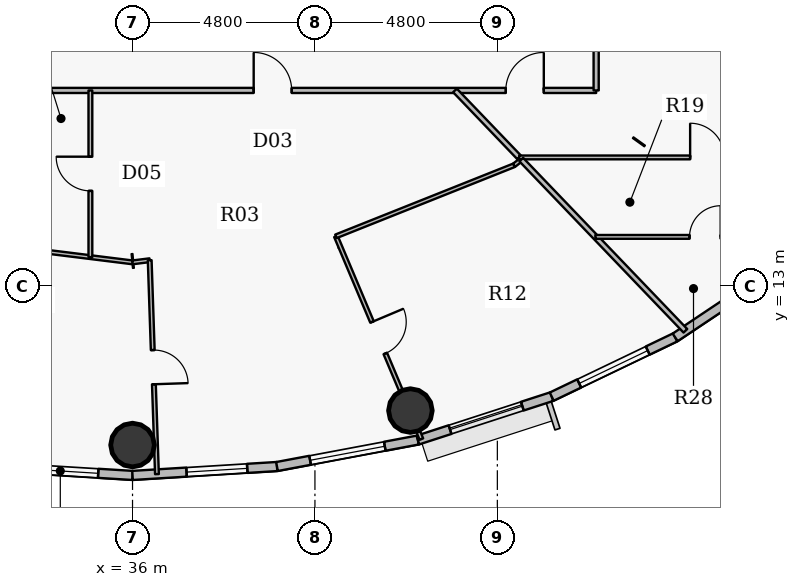
"""IFC4 building model, lengths in metres.
Left out: names, types, materials, properties, quantities, classifications, styles, units other than length and angle.
Written with IfcOpenShell. Run it as: python <this file> out.ifc"""

import sys

from ifc_helpers import new_model, si_unit, direction, frame, frame_2d, origin, origin_2d, place, context, subcontext, project, spatial, rectangle, hollow_circle, extrude, source, transform, mapped, element, fill, save


model = new_model("IFC4")
c1 = context("Model", 3, precision=1e-05, world=origin(), true_north=direction((0.0, 1.0)))
c2 = subcontext(c1, "Body", "Model", "MODEL_VIEW")
j1 = project(units=[si_unit("LENGTHUNIT", "METRE"), si_unit("PLANEANGLEUNIT", "RADIAN")], contexts=[c1])
p1 = place(None, origin())
s1 = spatial("IfcSite", under=j1, at=p1, CompositionType="ELEMENT")
p2 = place(p1, origin())
s2 = spatial("IfcBuilding", under=s1, at=p2, CompositionType="ELEMENT")
p3 = place(p2, frame((0.0, 0.0, 232.8)))
s3 = spatial("IfcBuildingStorey", under=s2, at=p3, CompositionType="ELEMENT", Elevation=232.8)
for number, where, z_axis, x_axis in (
    (1, (36.0, 8.82, 0.0), (0.0, 0.0, 1.0), (1.0, 0.0, 0.0)),
    (2, (43.312, 9.727, 0.0), (0.0, 0.0, 1.0), (1.0, 0.0, 0.0)),
):
    element("IfcColumn", number, at=place(p3, frame(where, z_axis=z_axis, x_axis=x_axis)), inside=s3, PredefinedType="COLUMN", context=c2, shape_type="SweptSolid", body=[
        extrude(hollow_circle(Radius=0.575, WallThickness=0.036, at=origin_2d()), origin(), (0.0, 0.0, 1.0), 3.75),
    ])
p4 = place(p3, frame((36.0, 8.02, 0.0), z_axis=(0.0, 0.0, 1.0), x_axis=(-0.998108785312, 0.06147237333, 0.0)))
e3 = element("IfcWall", 3, at=p4, inside=s3, PredefinedType="SOLIDWALL", context=c2, shape_type="SweptSolid", body=[
    extrude(rectangle(XDim=3.809, YDim=0.24, at=frame_2d((1.904, 0.0))), origin(), (0.0, 0.0, 1.0), 3.5),
])
p5 = place(p4, frame((0.904, 0.0, 0.9)))
e4 = element("IfcOpeningElement", 4, at=p5, cuts=e3, PredefinedType="OPENING", context=c2, shape_type="SweptSolid", body=[
    extrude(rectangle(XDim=2.0, YDim=1.75, at=origin_2d()), frame((1.0, 0.13, 0.875), z_axis=(0.0, -1.0, 0.0), x_axis=(1.0, 0.0, 0.0)), (0.0, 0.0, 1.0), 0.26),
])
p6 = place(p3, frame((39.802, 8.254, 0.0), z_axis=(0.0, 0.0, 1.0), x_axis=(-0.998108785312, -0.06147237333, 0.0)))
e5 = element("IfcWall", 5, at=p6, inside=s3, PredefinedType="SOLIDWALL", context=c2, shape_type="SweptSolid", body=[
    extrude(rectangle(XDim=3.809, YDim=0.24, at=frame_2d((1.904, 0.0))), origin(), (0.0, 0.0, 1.0), 3.5),
])
p7 = place(p6, frame((0.785, 0.0, 0.9)))
e6 = element("IfcOpeningElement", 6, at=p7, cuts=e5, PredefinedType="OPENING", context=c2, shape_type="SweptSolid", body=[
    extrude(rectangle(XDim=1.6, YDim=1.75, at=origin_2d()), frame((0.8, 0.13, 0.875), z_axis=(0.0, -1.0, 0.0), x_axis=(1.0, 0.0, 0.0)), (0.0, 0.0, 1.0), 0.26),
])
p8 = place(p3, frame((43.509, 8.951, 0.0), z_axis=(0.0, 0.0, 1.0), x_axis=(-0.982784898575, -0.184753465822, 0.0)))
e7 = element("IfcWall", 7, at=p8, inside=s3, PredefinedType="SOLIDWALL", context=c2, shape_type="SweptSolid", body=[
    extrude(rectangle(XDim=3.773, YDim=0.24, at=frame_2d((1.886, 0.0))), origin(), (0.0, 0.0, 1.0), 3.5),
])
p9 = place(p8, frame((0.886, 0.0, 0.9)))
e8 = element("IfcOpeningElement", 8, at=p9, cuts=e7, PredefinedType="OPENING", context=c2, shape_type="SweptSolid", body=[
    extrude(rectangle(XDim=2.0, YDim=1.75, at=origin_2d()), frame((1.0, 0.13, 0.875), z_axis=(0.0, -1.0, 0.0), x_axis=(1.0, 0.0, 0.0)), (0.0, 0.0, 1.0), 0.26),
])
p10 = place(p3, frame((47.031, 10.094, 0.0), z_axis=(0.0, 0.0, 1.0), x_axis=(-0.951210789182, -0.308541787354, 0.0)))
e9 = element("IfcWall", 9, at=p10, inside=s3, PredefinedType="SOLIDWALL", context=c2, shape_type="SweptSolid", body=[
    extrude(rectangle(XDim=3.702, YDim=0.24, at=frame_2d((1.851, 0.0))), origin(), (0.0, 0.0, 1.0), 3.5),
])
p11 = place(p10, frame((0.813, 0.0, 0.9)))
e10 = element("IfcOpeningElement", 10, at=p11, cuts=e9, PredefinedType="OPENING", context=c2, shape_type="SweptSolid", body=[
    extrude(rectangle(XDim=2.0, YDim=1.75, at=origin_2d()), frame((1.0, 0.13, 0.875), z_axis=(0.0, -1.0, 0.0), x_axis=(1.0, 0.0, 0.0)), (0.0, 0.0, 1.0), 0.26),
])
p12 = place(p3, frame((50.28, 11.652, 0.0), z_axis=(0.0, 0.0, 1.0), x_axis=(-0.901598104751, -0.432574684313, 0.0)))
e11 = element("IfcWall", 11, at=p12, inside=s3, PredefinedType="SOLIDWALL", context=c2, shape_type="SweptSolid", body=[
    extrude(rectangle(XDim=3.604, YDim=0.24, at=frame_2d((1.802, 0.0))), origin(), (0.0, 0.0, 1.0), 3.5),
])
p13 = place(p12, frame((0.802, 0.0, 0.9)))
e12 = element("IfcOpeningElement", 12, at=p13, cuts=e11, PredefinedType="OPENING", context=c2, shape_type="SweptSolid", body=[
    extrude(rectangle(XDim=2.0, YDim=1.75, at=origin_2d()), frame((1.0, 0.13, 0.875), z_axis=(0.0, -1.0, 0.0), x_axis=(1.0, 0.0, 0.0)), (0.0, 0.0, 1.0), 0.26),
])
p14 = place(p3, frame((53.176, 13.589, 0.0), z_axis=(0.0, 0.0, 1.0), x_axis=(-0.831262496074, -0.555880079352, 0.0)))
e13 = element("IfcWall", 13, at=p14, inside=s3, PredefinedType="SOLIDWALL", context=c2, shape_type="SweptSolid", body=[
    extrude(rectangle(XDim=3.484, YDim=0.24, at=frame_2d((1.742, 0.0))), origin(), (0.0, 0.0, 1.0), 3.5),
])
p15 = place(p3, frame((24.35, 18.15, 0.0), z_axis=(0.0, 0.0, 1.0), x_axis=(1.0, 0.0, 0.0)))
e14 = element("IfcWall", 14, at=p15, inside=s3, PredefinedType="PARTITIONING", context=c2, shape_type="SweptSolid", body=[
    extrude(rectangle(XDim=23.85, YDim=0.135, at=frame_2d((11.925, 0.0))), origin(), (0.0, 0.0, 1.0), 2.935),
])
p16 = place(p15, frame((14.838, 0.0, 0.0)))
e15 = element("IfcOpeningElement", 15, at=p16, cuts=e14, PredefinedType="OPENING", context=c2, shape_type="SweptSolid", body=[
    extrude(rectangle(XDim=1.0, YDim=2.15, at=origin_2d()), frame((0.5, 0.078, 1.075), z_axis=(0.0, -1.0, 0.0), x_axis=(1.0, 0.0, 0.0)), (0.0, 0.0, 1.0), 0.155),
])
p17 = place(p15, frame((21.472, 0.0, 0.0)))
e16 = element("IfcOpeningElement", 16, at=p17, cuts=e14, PredefinedType="OPENING", context=c2, shape_type="SweptSolid", body=[
    extrude(rectangle(XDim=1.0, YDim=2.15, at=origin_2d()), frame((0.5, 0.078, 1.075), z_axis=(0.0, -1.0, 0.0), x_axis=(1.0, 0.0, 0.0)), (0.0, 0.0, 1.0), 0.155),
])
p18 = place(p3, frame((30.722, 14.281, 0.0), z_axis=(0.0, 0.0, 1.0), x_axis=(0.992398864395, -0.123062967412, 0.0)))
e17 = element("IfcWall", 17, at=p18, inside=s3, PredefinedType="PARTITIONING", context=c2, shape_type="SweptSolid", body=[
    extrude(rectangle(XDim=5.319, YDim=0.1, at=frame_2d((2.659, 0.0))), origin(), (0.0, 0.0, 1.0), 2.935),
])
p19 = place(p3, frame((34.891, 13.764, 0.0), z_axis=(0.0, 0.0, 1.0), x_axis=(0.0, 1.0, 0.0)))
e18 = element("IfcWall", 18, at=p19, inside=s3, PredefinedType="PARTITIONING", context=c2, shape_type="SweptSolid", body=[
    extrude(rectangle(XDim=4.386, YDim=0.1, at=frame_2d((2.193, 0.0))), origin(), (0.0, 0.0, 1.0), 3.5),
])
p20 = place(p19, frame((1.743, 0.0, 0.0)))
e19 = element("IfcOpeningElement", 19, at=p20, cuts=e18, PredefinedType="OPENING", context=c2, shape_type="SweptSolid", body=[
    extrude(rectangle(XDim=0.9, YDim=2.1, at=origin_2d()), frame((0.45, 0.06, 1.05), z_axis=(0.0, -1.0, 0.0), x_axis=(1.0, 0.0, 0.0)), (0.0, 0.0, 1.0), 0.12),
])
p21 = place(p3, frame((36.0, 13.626, 0.0), z_axis=(0.0, 0.0, 1.0), x_axis=(0.992368340182, 0.123308869931, 0.0)))
e20 = element("IfcWall", 20, at=p21, inside=s3, PredefinedType="PARTITIONING", context=c2, shape_type="SweptSolid", body=[
    extrude(rectangle(XDim=0.455, YDim=0.1, at=frame_2d((0.228, 0.0))), origin(), (0.0, 0.0, 1.0), 2.935),
])
p22 = place(p3, frame((36.452, 13.683, 0.0), z_axis=(0.0, 0.0, 1.0), x_axis=(0.033903801357, -0.999425100872, 0.0)))
e21 = element("IfcWall", 21, at=p22, inside=s3, PredefinedType="PARTITIONING", context=c2, shape_type="SweptSolid", body=[
    extrude(rectangle(XDim=5.631, YDim=0.1, at=frame_2d((2.815, 0.0))), origin(), (0.0, 0.0, 1.0), 2.985),
])
p23 = place(p22, frame((2.365, 0.0, 0.0)))
e22 = element("IfcOpeningElement", 22, at=p23, cuts=e21, PredefinedType="OPENING", context=c2, shape_type="SweptSolid", body=[
    extrude(rectangle(XDim=0.9, YDim=2.1, at=origin_2d()), frame((0.45, 0.06, 1.05), z_axis=(0.0, -1.0, 0.0), x_axis=(1.0, 0.0, 0.0)), (0.0, 0.0, 1.0), 0.12),
])
p24 = place(p3, frame((41.352, 14.311, 0.0), z_axis=(0.0, 0.0, 1.0), x_axis=(0.388594226314, -0.921408990229, 0.0)))
e23 = element("IfcWall", 23, at=p24, inside=s3, PredefinedType="PARTITIONING", context=c2, shape_type="SweptSolid", body=[
    extrude(rectangle(XDim=5.79, YDim=0.1, at=frame_2d((2.895, 0.0))), origin(), (0.0, 0.0, 1.0), 2.935),
])
p25 = place(p24, frame((2.445, 0.0, 0.0)))
e24 = element("IfcOpeningElement", 24, at=p25, cuts=e23, PredefinedType="OPENING", context=c2, shape_type="SweptSolid", body=[
    extrude(rectangle(XDim=0.9, YDim=2.1, at=origin_2d()), frame((0.45, 0.06, 1.05), z_axis=(0.0, -1.0, 0.0), x_axis=(1.0, 0.0, 0.0)), (0.0, 0.0, 1.0), 0.12),
])
p26 = place(p3, frame((41.352, 14.311, 0.0), z_axis=(0.0, 0.0, 1.0), x_axis=(0.928803297531, 0.370573116261, 0.0)))
e25 = element("IfcWall", 25, at=p26, inside=s3, PredefinedType="PARTITIONING", context=c2, shape_type="SweptSolid", body=[
    extrude(rectangle(XDim=5.047, YDim=0.1, at=frame_2d((2.523, 0.0))), origin(), (0.0, 0.0, 1.0), 2.935),
])
p27 = place(p3, frame((44.485, 18.15, 0.0), z_axis=(0.0, 0.0, 1.0), x_axis=(0.692102956666, -0.72179879286, 0.0)))
e26 = element("IfcWall", 26, at=p27, inside=s3, PredefinedType="PARTITIONING", context=c2, shape_type="SweptSolid", body=[
    extrude(rectangle(XDim=2.442, YDim=0.135, at=frame_2d((1.221, 0.0))), origin(), (0.0, 0.0, 1.0), 3.5),
])
p28 = place(p3, frame((46.039, 16.181, 0.0), z_axis=(0.0, 0.0, 1.0), x_axis=(0.787611392409, 0.616172292909, 0.0)))
e27 = element("IfcWall", 27, at=p28, inside=s3, PredefinedType="PARTITIONING", context=c2, shape_type="SweptSolid", body=[
    extrude(rectangle(XDim=0.242, YDim=0.1, at=frame_2d((0.121, 0.0))), origin(), (0.0, 0.0, 1.0), 3.5),
])
p29 = place(p3, frame((46.175, 16.387, 0.0), z_axis=(0.0, 0.0, 1.0), x_axis=(1.0, 0.0, 0.0)))
e28 = element("IfcWall", 28, at=p29, inside=s3, PredefinedType="PARTITIONING", context=c2, shape_type="SweptSolid", body=[
    extrude(rectangle(XDim=9.896, YDim=0.1, at=frame_2d((4.948, 0.0))), origin(), (0.0, 0.0, 1.0), 2.935),
])
p30 = place(p29, frame((4.498, 0.0, 0.0)))
e29 = element("IfcOpeningElement", 29, at=p30, cuts=e28, PredefinedType="OPENING", context=c2, shape_type="SweptSolid", body=[
    extrude(rectangle(XDim=0.9, YDim=2.1, at=origin_2d()), frame((0.45, 0.06, 1.05), z_axis=(0.0, -1.0, 0.0), x_axis=(1.0, 0.0, 0.0)), (0.0, 0.0, 1.0), 0.12),
])
p31 = place(p3, frame((46.23, 16.33, 0.0), z_axis=(0.0, 0.0, 1.0), x_axis=(0.69206255942, -0.721837525935, 0.0)))
e30 = element("IfcWall", 30, at=p31, inside=s3, PredefinedType="PARTITIONING", context=c2, shape_type="SweptSolid", body=[
    extrude(rectangle(XDim=6.24, YDim=0.135, at=frame_2d((3.12, 0.0))), origin(), (0.0, 0.0, 1.0), 2.985),
])
p32 = place(p3, frame((48.179, 14.297, 0.0), z_axis=(0.0, 0.0, 1.0), x_axis=(1.0, 0.0, 0.0)))
e31 = element("IfcWall", 31, at=p32, inside=s3, PredefinedType="PARTITIONING", context=c2, shape_type="SweptSolid", body=[
    extrude(rectangle(XDim=5.776, YDim=0.1, at=frame_2d((2.888, 0.0))), origin(), (0.0, 0.0, 1.0), 2.935),
])
p33 = place(p32, frame((2.478, 0.0, 0.0)))
e32 = element("IfcOpeningElement", 32, at=p33, cuts=e31, PredefinedType="OPENING", context=c2, shape_type="SweptSolid", body=[
    extrude(rectangle(XDim=0.82, YDim=2.1, at=origin_2d()), frame((0.41, 0.06, 1.05), z_axis=(0.0, -1.0, 0.0), x_axis=(1.0, 0.0, 0.0)), (0.0, 0.0, 1.0), 0.12),
])
p34 = place(p3, frame((48.2, 18.15, 0.0), z_axis=(0.0, 0.0, 1.0), x_axis=(0.0, 1.0, 0.0)))
e33 = element("IfcWall", 33, at=p34, inside=s3, PredefinedType="PARTITIONING", context=c2, shape_type="SweptSolid", body=[
    extrude(rectangle(XDim=1.9, YDim=0.135, at=frame_2d((0.95, 0.0))), origin(), (0.0, 0.0, 1.0), 3.5),
])
p35 = place(p3, frame((50.482, 20.16, 0.0), z_axis=(0.0, 0.0, 1.0), x_axis=(0.904207257568, -0.42709394208, 0.0)))
e34 = element("IfcWall", 34, at=p35, inside=s3, PredefinedType="PARTITIONING", context=c2, shape_type="SweptSolid", body=[
    extrude(rectangle(XDim=6.897, YDim=0.1, at=frame_2d((3.448, 0.0))), origin(), (0.0, 0.0, 1.0), 2.985),
])
p36 = place(p35, frame((2.998, 0.0, 0.0)))
e35 = element("IfcOpeningElement", 35, at=p36, cuts=e34, PredefinedType="OPENING", context=c2, shape_type="SweptSolid", body=[
    extrude(rectangle(XDim=0.9, YDim=2.1, at=origin_2d()), frame((0.45, 0.06, 1.05), z_axis=(0.0, -1.0, 0.0), x_axis=(1.0, 0.0, 0.0)), (0.0, 0.0, 1.0), 0.12),
])
m1 = source(origin(), c2, "Body", "SweptSolid", [
    extrude(rectangle(XDim=2.0, YDim=1.75, at=origin_2d()), frame((1.0, 0.03, 0.875), z_axis=(0.0, -1.0, 0.0), x_axis=(1.0, 0.0, 0.0)), (0.0, 0.0, 1.0), 0.06),
])
p37 = place(p5, origin())
e36 = element("IfcWindow", 36, at=p37, inside=s3, PartitioningType="DOUBLE_PANEL_VERTICAL", PredefinedType="WINDOW", context=c2, shape_type="MappedRepresentation", body=[
    mapped(m1, transform((0.0, 0.0, 0.0), x_axis=(1.0, 0.0, 0.0), y_axis=(0.0, 1.0, 0.0), z_axis=(0.0, 0.0, 1.0), scale=1.0)),
])
fill(e4, e36)
m2 = source(origin(), c2, "Body", "SweptSolid", [
    extrude(rectangle(XDim=1.6, YDim=1.75, at=origin_2d()), frame((0.8, 0.03, 0.875), z_axis=(0.0, -1.0, 0.0), x_axis=(1.0, 0.0, 0.0)), (0.0, 0.0, 1.0), 0.06),
])
p38 = place(p7, origin())
e37 = element("IfcWindow", 37, at=p38, inside=s3, PartitioningType="DOUBLE_PANEL_VERTICAL", PredefinedType="WINDOW", context=c2, shape_type="MappedRepresentation", body=[
    mapped(m2, transform((0.0, 0.0, 0.0), x_axis=(1.0, 0.0, 0.0), y_axis=(0.0, 1.0, 0.0), z_axis=(0.0, 0.0, 1.0), scale=1.0)),
])
fill(e6, e37)
p39 = place(p9, origin())
e38 = element("IfcWindow", 38, at=p39, inside=s3, PartitioningType="DOUBLE_PANEL_VERTICAL", PredefinedType="WINDOW", context=c2, shape_type="MappedRepresentation", body=[
    mapped(m1, transform((0.0, 0.0, 0.0), x_axis=(1.0, 0.0, 0.0), y_axis=(0.0, 1.0, 0.0), z_axis=(0.0, 0.0, 1.0), scale=1.0)),
])
fill(e8, e38)
p40 = place(p11, origin())
e39 = element("IfcWindow", 39, at=p40, inside=s3, PartitioningType="DOUBLE_PANEL_VERTICAL", PredefinedType="WINDOW", context=c2, shape_type="MappedRepresentation", body=[
    mapped(m1, transform((0.0, 0.0, 0.0), x_axis=(1.0, 0.0, 0.0), y_axis=(0.0, 1.0, 0.0), z_axis=(0.0, 0.0, 1.0), scale=1.0)),
])
fill(e10, e39)
p41 = place(p13, origin())
e40 = element("IfcWindow", 40, at=p41, inside=s3, PartitioningType="DOUBLE_PANEL_VERTICAL", PredefinedType="WINDOW", context=c2, shape_type="MappedRepresentation", body=[
    mapped(m1, transform((0.0, 0.0, 0.0), x_axis=(1.0, 0.0, 0.0), y_axis=(0.0, 1.0, 0.0), z_axis=(0.0, 0.0, 1.0), scale=1.0)),
])
fill(e12, e40)
m3 = source(origin(), c2, "Body", "SweptSolid", [
    extrude(rectangle(XDim=1.0, YDim=2.15, at=origin_2d()), frame((0.5, 0.025, 1.075), z_axis=(0.0, -1.0, 0.0), x_axis=(1.0, 0.0, 0.0)), (0.0, 0.0, 1.0), 0.05),
])
p42 = place(p16, origin())
e41 = element("IfcDoor", 41, at=p42, inside=s3, OperationType="SINGLE_SWING_LEFT", PredefinedType="DOOR", context=c2, shape_type="MappedRepresentation", body=[
    mapped(m3, transform((0.0, 0.0, 0.0), x_axis=(1.0, 0.0, 0.0), y_axis=(0.0, 1.0, 0.0), z_axis=(0.0, 0.0, 1.0), scale=1.0)),
])
fill(e15, e41)
m4 = source(origin(), c2, "Body", "SweptSolid", [
    extrude(rectangle(XDim=0.9, YDim=2.1, at=origin_2d()), frame((0.45, 0.025, 1.05), z_axis=(0.0, -1.0, 0.0), x_axis=(1.0, 0.0, 0.0)), (0.0, 0.0, 1.0), 0.05),
])
p43 = place(p23, origin())
e42 = element("IfcDoor", 42, at=p43, inside=s3, OperationType="SINGLE_SWING_RIGHT", PredefinedType="DOOR", context=c2, shape_type="MappedRepresentation", body=[
    mapped(m4, transform((0.0, 0.0, 0.0), x_axis=(1.0, 0.0, 0.0), y_axis=(0.0, 1.0, 0.0), z_axis=(0.0, 0.0, 1.0), scale=1.0)),
])
fill(e22, e42)
p44 = place(p25, origin())
e43 = element("IfcDoor", 43, at=p44, inside=s3, OperationType="SINGLE_SWING_LEFT", PredefinedType="DOOR", context=c2, shape_type="MappedRepresentation", body=[
    mapped(m4, transform((0.0, 0.0, 0.0), x_axis=(1.0, 0.0, 0.0), y_axis=(0.0, 1.0, 0.0), z_axis=(0.0, 0.0, 1.0), scale=1.0)),
])
fill(e24, e43)
p45 = place(p20, origin())
e44 = element("IfcDoor", 44, at=p45, inside=s3, OperationType="SINGLE_SWING_RIGHT", PredefinedType="DOOR", context=c2, shape_type="MappedRepresentation", body=[
    mapped(m4, transform((0.0, 0.0, 0.0), x_axis=(1.0, 0.0, 0.0), y_axis=(0.0, 1.0, 0.0), z_axis=(0.0, 0.0, 1.0), scale=1.0)),
])
fill(e19, e44)
p46 = place(p17, origin())
e45 = element("IfcDoor", 45, at=p46, inside=s3, OperationType="SINGLE_SWING_RIGHT", PredefinedType="DOOR", context=c2, shape_type="MappedRepresentation", body=[
    mapped(m3, transform((0.0, 0.0, 0.0), x_axis=(1.0, 0.0, 0.0), y_axis=(0.0, 1.0, 0.0), z_axis=(0.0, 0.0, 1.0), scale=1.0)),
])
fill(e16, e45)
p47 = place(p30, origin())
e46 = element("IfcDoor", 46, at=p47, inside=s3, OperationType="SINGLE_SWING_LEFT", PredefinedType="DOOR", context=c2, shape_type="MappedRepresentation", body=[
    mapped(m4, transform((0.0, 0.0, 0.0), x_axis=(1.0, 0.0, 0.0), y_axis=(0.0, 1.0, 0.0), z_axis=(0.0, 0.0, 1.0), scale=1.0)),
])
fill(e29, e46)
m5 = source(origin(), c2, "Body", "SweptSolid", [
    extrude(rectangle(XDim=0.82, YDim=2.1, at=origin_2d()), frame((0.41, 0.025, 1.05), z_axis=(0.0, -1.0, 0.0), x_axis=(1.0, 0.0, 0.0)), (0.0, 0.0, 1.0), 0.05),
])
p48 = place(p33, origin())
e47 = element("IfcDoor", 47, at=p48, inside=s3, OperationType="SINGLE_SWING_RIGHT", PredefinedType="DOOR", context=c2, shape_type="MappedRepresentation", body=[
    mapped(m5, transform((0.0, 0.0, 0.0), x_axis=(1.0, 0.0, 0.0), y_axis=(0.0, 1.0, 0.0), z_axis=(0.0, 0.0, 1.0), scale=1.0)),
])
fill(e32, e47)
save(model, sys.argv[1])
